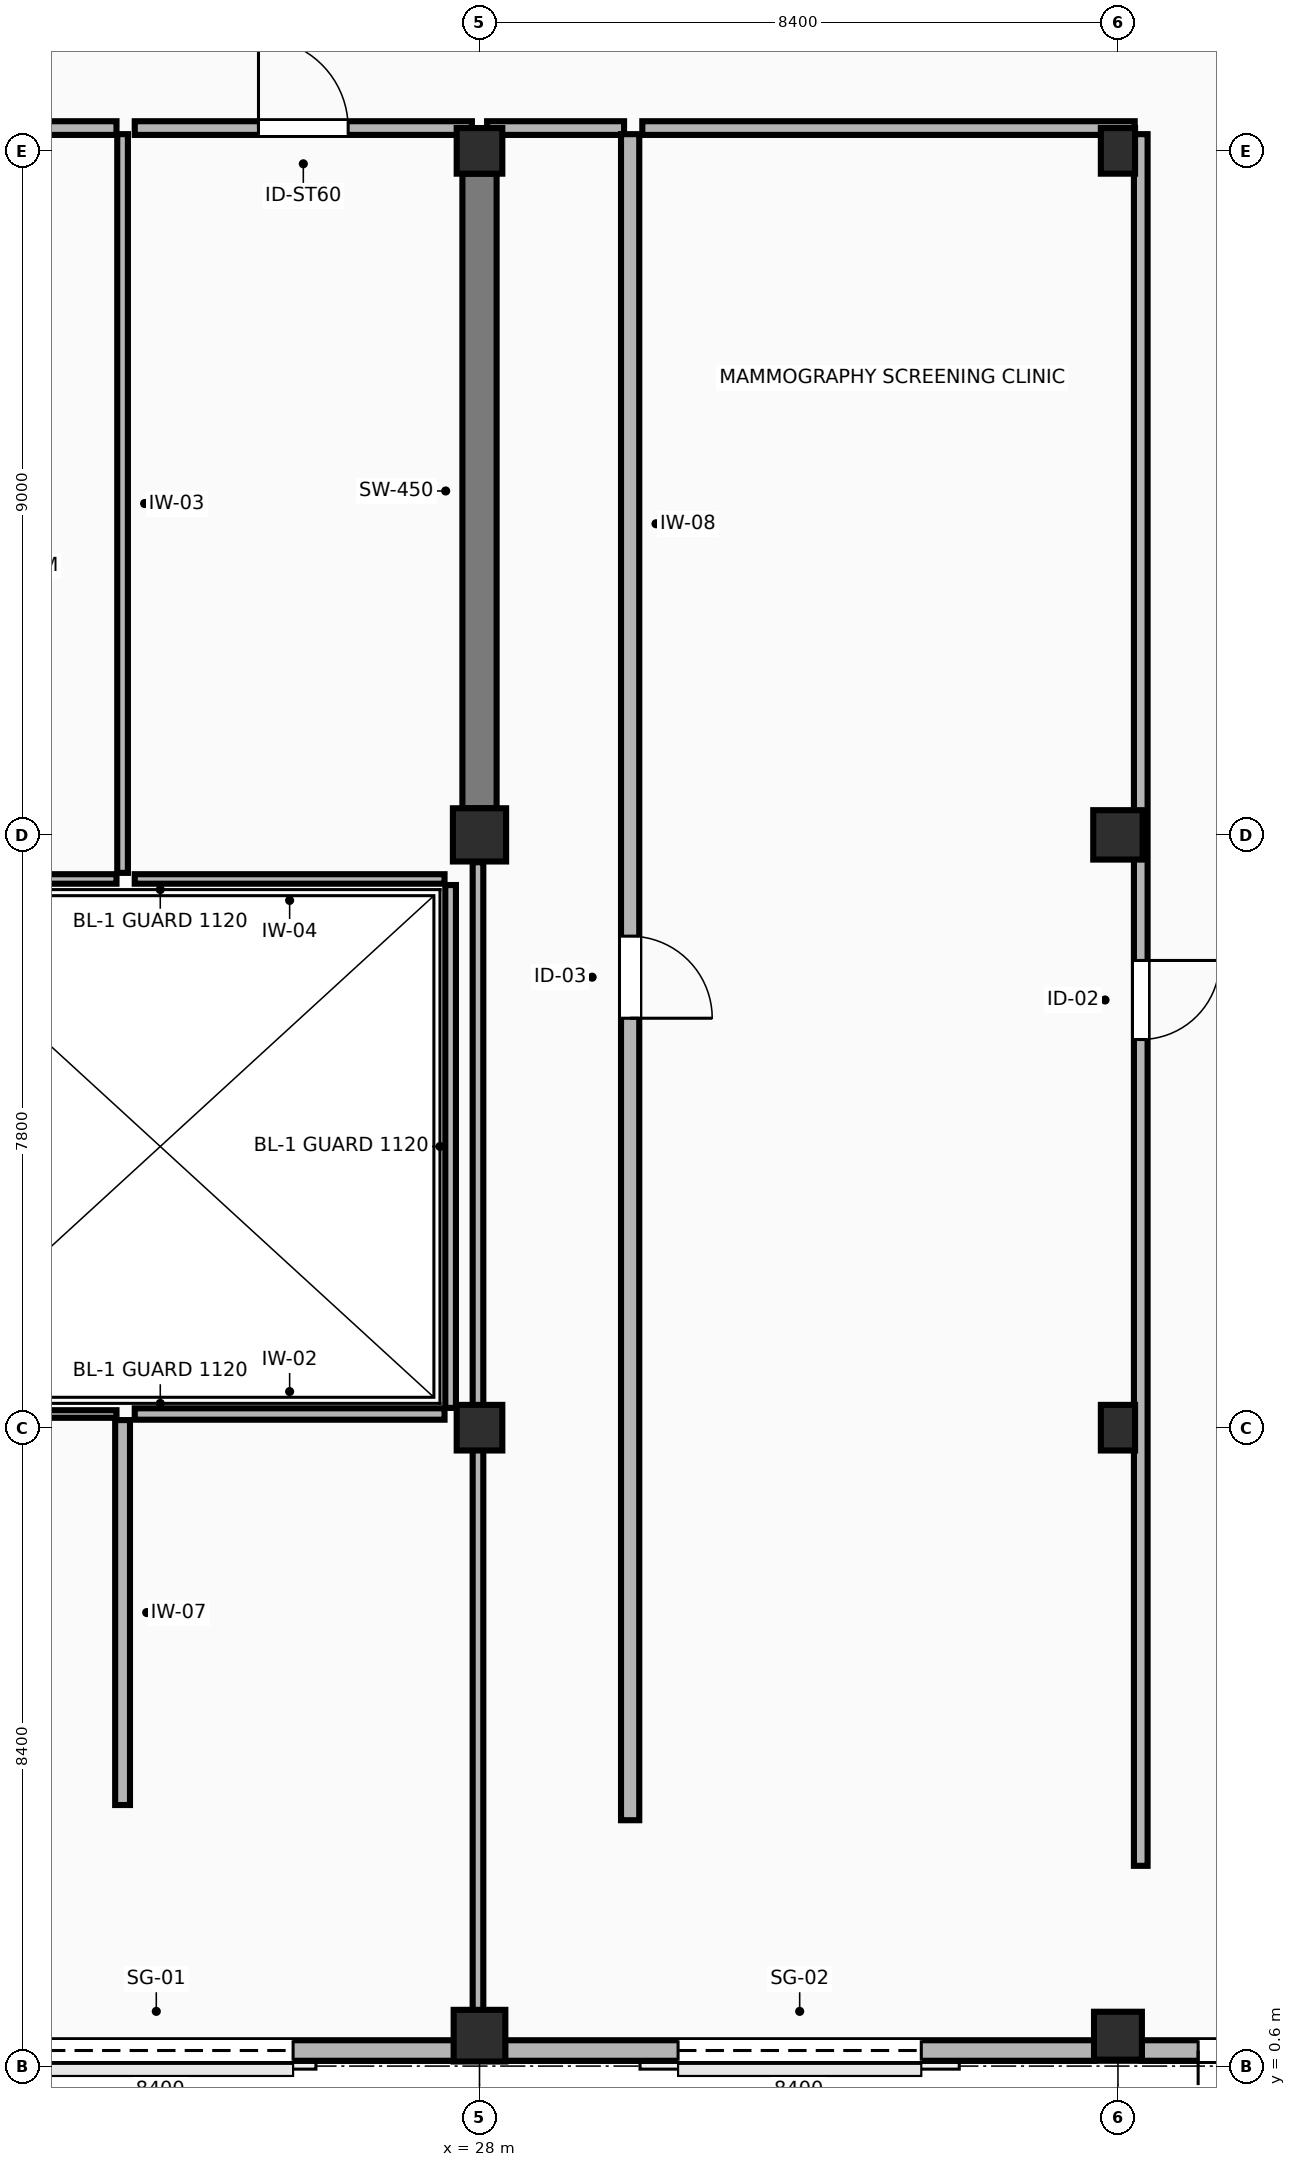
"""IFC4 building model, lengths in metres.
Left out: names, types, materials, properties, quantities, classifications, styles, units other than length and angle.
Written with IfcOpenShell. Run it as: python <this file> out.ifc"""

import sys

from ifc_helpers import new_model, si_unit, direction, frame, frame_2d, origin, origin_2d, place, context, subcontext, project, spatial, rectangle, extrude, element, fill, save


model = new_model("IFC4")
c1 = context("Model", 3, precision=1e-05, world=origin(), true_north=direction((0.0, 1.0)))
c2 = subcontext(c1, "Body", "Model", "MODEL_VIEW")
j1 = project(units=[si_unit("LENGTHUNIT", "METRE"), si_unit("PLANEANGLEUNIT", "RADIAN")], contexts=[c1])
p1 = place(None, origin())
s1 = spatial("IfcSite", under=j1, at=p1, CompositionType="ELEMENT")
p2 = place(p1, origin())
s2 = spatial("IfcBuilding", under=s1, at=p2, CompositionType="ELEMENT")
p3 = place(p2, origin())
s3 = spatial("IfcBuildingStorey", under=s2, at=p3, CompositionType="ELEMENT", Elevation=0.0)
p4 = place(p3, frame((28.0, 1.0, -1.75), z_axis=(0.0, 0.0, 1.0), x_axis=(1.0, 0.0, 0.0)))
e1 = element("IfcColumn", 1, at=p4, inside=s3, PredefinedType="COLUMN", context=c2, shape_type="SweptSolid", body=[
    extrude(rectangle(XDim=0.68, YDim=0.68, at=origin_2d()), origin(), (0.0, 0.0, 1.0), 7.15),
])
p5 = place(p3, frame((28.0, 9.0, 0.0), z_axis=(0.0, 0.0, 1.0), x_axis=(1.0, 0.0, 0.0)))
e2 = element("IfcColumn", 2, at=p5, inside=s3, PredefinedType="COLUMN", context=c2, shape_type="SweptSolid", body=[
    extrude(rectangle(XDim=0.6, YDim=0.6, at=origin_2d()), origin(), (0.0, 0.0, 1.0), 5.4),
])
p6 = place(p3, frame((28.0, 16.8, 0.0), z_axis=(0.0, 0.0, 1.0), x_axis=(1.0, 0.0, 0.0)))
e3 = element("IfcColumn", 3, at=p6, inside=s3, PredefinedType="COLUMN", context=c2, shape_type="SweptSolid", body=[
    extrude(rectangle(XDim=0.7, YDim=0.7, at=origin_2d()), origin(), (0.0, 0.0, 1.0), 5.4),
])
p7 = place(p3, frame((28.0, 25.8, 0.0), z_axis=(0.0, 0.0, 1.0), x_axis=(1.0, 0.0, 0.0)))
e4 = element("IfcColumn", 4, at=p7, inside=s3, PredefinedType="COLUMN", context=c2, shape_type="SweptSolid", body=[
    extrude(rectangle(XDim=0.6, YDim=0.6, at=origin_2d()), origin(), (0.0, 0.0, 1.0), 5.4),
])
p8 = place(p3, frame((36.4, 1.0, -1.75), z_axis=(0.0, 0.0, 1.0), x_axis=(1.0, 0.0, 0.0)))
e5 = element("IfcColumn", 5, at=p8, inside=s3, PredefinedType="COLUMN", context=c2, shape_type="SweptSolid", body=[
    extrude(rectangle(XDim=0.63, YDim=0.63, at=origin_2d()), origin(), (0.0, 0.0, 1.0), 7.15),
])
p9 = place(p3, frame((36.4, 9.0, 0.0), z_axis=(0.0, 0.0, 1.0), x_axis=(1.0, 0.0, 0.0)))
e6 = element("IfcColumn", 6, at=p9, inside=s3, PredefinedType="COLUMN", context=c2, shape_type="SweptSolid", body=[
    extrude(rectangle(XDim=0.45, YDim=0.6, at=origin_2d()), origin(), (0.0, 0.0, 1.0), 5.4),
])
p10 = place(p3, frame((36.4, 16.8, 0.0), z_axis=(0.0, 0.0, 1.0), x_axis=(1.0, 0.0, 0.0)))
e7 = element("IfcColumn", 7, at=p10, inside=s3, PredefinedType="COLUMN", context=c2, shape_type="SweptSolid", body=[
    extrude(rectangle(XDim=0.65, YDim=0.65, at=origin_2d()), origin(), (0.0, 0.0, 1.0), 5.4),
])
p11 = place(p3, frame((36.4, 25.8, 0.0), z_axis=(0.0, 0.0, 1.0), x_axis=(1.0, 0.0, 0.0)))
e8 = element("IfcColumn", 8, at=p11, inside=s3, PredefinedType="COLUMN", context=c2, shape_type="SweptSolid", body=[
    extrude(rectangle(XDim=0.45, YDim=0.6, at=origin_2d()), origin(), (0.0, 0.0, 1.0), 5.4),
])
p12 = place(p3, frame((19.83, 0.805, 0.0), z_axis=(0.0, 0.0, 1.0), x_axis=(1.0, 0.0, 0.0)))
e9 = element("IfcWall", 9, at=p12, inside=s3, PredefinedType="STANDARD", context=c2, shape_type="SweptSolid", body=[
    extrude(rectangle(XDim=7.835, YDim=0.27, at=frame_2d((3.917, 0.0))), origin(), (0.0, 0.0, 1.0), 4.42),
])
p13 = place(p12, frame((2.117, 0.0, 0.0)))
e10 = element("IfcOpeningElement", 10, at=p13, cuts=e9, PredefinedType="OPENING", context=c2, shape_type="SweptSolid", body=[
    extrude(rectangle(XDim=3.6, YDim=3.0, at=frame_2d((1.8, 1.5))), frame((0.0, 0.145, 0.0), z_axis=(0.0, -1.0, 0.0), x_axis=(1.0, 0.0, 0.0)), (0.0, 0.0, 1.0), 0.29),
])
p14 = place(p3, frame((28.335, 0.805, 0.0), z_axis=(0.0, 0.0, 1.0), x_axis=(1.0, 0.0, 0.0)))
e11 = element("IfcWall", 11, at=p14, inside=s3, PredefinedType="STANDARD", context=c2, shape_type="SweptSolid", body=[
    extrude(rectangle(XDim=7.755, YDim=0.27, at=frame_2d((3.877, 0.0))), origin(), (0.0, 0.0, 1.0), 4.42),
])
p15 = place(p14, frame((2.278, 0.0, 0.0)))
e12 = element("IfcOpeningElement", 12, at=p15, cuts=e11, PredefinedType="OPENING", context=c2, shape_type="SweptSolid", body=[
    extrude(rectangle(XDim=3.2, YDim=2.8, at=frame_2d((1.6, 1.4))), frame((0.0, 0.145, 0.0), z_axis=(0.0, -1.0, 0.0), x_axis=(1.0, 0.0, 0.0)), (0.0, 0.0, 1.0), 0.29),
])
p16 = place(p3, frame((36.71, 0.805, 0.0), z_axis=(0.0, 0.0, 1.0), x_axis=(1.0, 0.0, 0.0)))
e13 = element("IfcWall", 13, at=p16, inside=s3, PredefinedType="STANDARD", context=c2, shape_type="SweptSolid", body=[
    extrude(rectangle(XDim=7.805, YDim=0.27, at=frame_2d((3.902, 0.0))), origin(), (0.0, 0.0, 1.0), 4.42),
])
p17 = place(p16, frame((0.745, 0.0, 0.0)))
e14 = element("IfcOpeningElement", 14, at=p17, cuts=e13, PredefinedType="OPENING", context=c2, shape_type="SweptSolid", body=[
    extrude(rectangle(XDim=2.0, YDim=2.4, at=frame_2d((1.0, 1.2))), frame((0.0, 0.145, 0.0), z_axis=(0.0, -1.0, 0.0), x_axis=(1.0, 0.0, 0.0)), (0.0, 0.0, 1.0), 0.29),
])
p18 = place(p3, frame((28.0, 17.15, -0.35), z_axis=(0.0, 0.0, 1.0), x_axis=(0.0, 1.0, 0.0)))
e15 = element("IfcWall", 15, at=p18, inside=s3, PredefinedType="SHEAR", context=c2, shape_type="SweptSolid", body=[
    extrude(rectangle(XDim=8.35, YDim=0.45, at=frame_2d((4.175, 0.0))), origin(), (0.0, 0.0, 1.0), 5.4),
])
p19 = place(p3, frame((17.38, 26.1, 0.0), z_axis=(0.0, 0.0, 1.0), x_axis=(1.0, 0.0, 0.0)))
e16 = element("IfcWall", 16, at=p19, inside=s3, PredefinedType="PARTITIONING", context=c2, shape_type="SweptSolid", body=[
    extrude(rectangle(XDim=5.844, YDim=0.18, at=frame_2d((2.922, 0.0))), origin(), (0.0, 0.0, 1.0), 4.385),
])
p20 = place(p19, frame((2.922, 0.0, 0.0)))
e17 = element("IfcOpeningElement", 17, at=p20, cuts=e16, PredefinedType="OPENING", context=c2, shape_type="SweptSolid", body=[
    extrude(rectangle(XDim=1.5, YDim=2.3, at=frame_2d((0.75, 1.15))), frame((0.0, 0.1, 0.0), z_axis=(0.0, -1.0, 0.0), x_axis=(1.0, 0.0, 0.0)), (0.0, 0.0, 1.0), 0.2),
])
p21 = place(p3, frame((23.304, 26.02, 0.0), z_axis=(0.0, 0.0, 1.0), x_axis=(0.0, -1.0, 0.0)))
e18 = element("IfcWall", 18, at=p21, inside=s3, PredefinedType="PARTITIONING", context=c2, shape_type="SweptSolid", body=[
    extrude(rectangle(XDim=9.72, YDim=0.14, at=frame_2d((4.86, 0.0))), origin(), (0.0, 0.0, 1.0), 5.05),
])
p22 = place(p3, frame((23.224, 16.22, 0.0), z_axis=(0.0, 0.0, 1.0), x_axis=(-1.0, 0.0, 0.0)))
e19 = element("IfcWall", 19, at=p22, inside=s3, PredefinedType="PARTITIONING", context=c2, shape_type="SweptSolid", body=[
    extrude(rectangle(XDim=3.164, YDim=0.125, at=frame_2d((1.582, 0.0))), origin(), (0.0, 0.0, 1.0), 5.05),
])
p23 = place(p3, frame((20.06, 9.18, 0.0), z_axis=(0.0, 0.0, 1.0), x_axis=(1.0, 0.0, 0.0)))
e20 = element("IfcWall", 20, at=p23, inside=s3, PredefinedType="PARTITIONING", context=c2, shape_type="SweptSolid", body=[
    extrude(rectangle(XDim=3.164, YDim=0.1, at=frame_2d((1.582, 0.0))), origin(), (0.0, 0.0, 1.0), 4.46),
])
p24 = place(p3, frame((23.304, 9.1, 0.0), z_axis=(0.0, 0.0, 1.0), x_axis=(0.0, -1.0, 0.0)))
e21 = element("IfcWall", 21, at=p24, inside=s3, PredefinedType="PARTITIONING", context=c2, shape_type="SweptSolid", body=[
    extrude(rectangle(XDim=5.065, YDim=0.195, at=frame_2d((2.533, 0.0))), origin(), (0.0, 0.0, 1.0), 5.05),
])
p25 = place(p3, frame((23.464, 9.18, 0.0), z_axis=(0.0, 0.0, 1.0), x_axis=(1.0, 0.0, 0.0)))
e22 = element("IfcWall", 22, at=p25, inside=s3, PredefinedType="PARTITIONING", context=c2, shape_type="SweptSolid", body=[
    extrude(rectangle(XDim=4.076, YDim=0.15, at=frame_2d((2.038, 0.0))), origin(), (0.0, 0.0, 1.0), 4.46),
])
p26 = place(p3, frame((27.62, 9.26, 0.0), z_axis=(0.0, 0.0, 1.0), x_axis=(0.0, 1.0, 0.0)))
e23 = element("IfcWall", 23, at=p26, inside=s3, PredefinedType="PARTITIONING", context=c2, shape_type="SweptSolid", body=[
    extrude(rectangle(XDim=6.88, YDim=0.14, at=frame_2d((3.44, 0.0))), origin(), (0.0, 0.0, 1.0), 4.61),
])
p27 = place(p3, frame((27.54, 16.22, 0.0), z_axis=(0.0, 0.0, 1.0), x_axis=(-1.0, 0.0, 0.0)))
e24 = element("IfcWall", 24, at=p27, inside=s3, PredefinedType="PARTITIONING", context=c2, shape_type="SweptSolid", body=[
    extrude(rectangle(XDim=4.076, YDim=0.125, at=frame_2d((2.038, 0.0))), origin(), (0.0, 0.0, 1.0), 5.05),
])
p28 = place(p3, frame((23.464, 26.1, 0.0), z_axis=(0.0, 0.0, 1.0), x_axis=(1.0, 0.0, 0.0)))
e25 = element("IfcWall", 25, at=p28, inside=s3, PredefinedType="PARTITIONING", context=c2, shape_type="SweptSolid", body=[
    extrude(rectangle(XDim=4.436, YDim=0.18, at=frame_2d((2.218, 0.0))), origin(), (0.0, 0.0, 1.0), 4.385),
])
p29 = place(p28, frame((1.628, 0.0, 0.0)))
e26 = element("IfcOpeningElement", 26, at=p29, cuts=e25, PredefinedType="OPENING", context=c2, shape_type="SweptSolid", body=[
    extrude(rectangle(XDim=1.18, YDim=2.18, at=frame_2d((0.59, 1.09))), frame((0.0, 0.1, 0.0), z_axis=(0.0, -1.0, 0.0), x_axis=(1.0, 0.0, 0.0)), (0.0, 0.0, 1.0), 0.2),
])
p30 = place(p3, frame((27.98, 16.44, 0.0), z_axis=(0.0, 0.0, 1.0), x_axis=(0.0, -1.0, 0.0)))
e27 = element("IfcWall", 27, at=p30, inside=s3, PredefinedType="PARTITIONING", context=c2, shape_type="SweptSolid", body=[
    extrude(rectangle(XDim=15.35, YDim=0.14, at=frame_2d((7.675, 0.0))), origin(), (0.0, 0.0, 1.0), 4.61),
])
p31 = place(p3, frame((28.1, 26.1, 0.0), z_axis=(0.0, 0.0, 1.0), x_axis=(1.0, 0.0, 0.0)))
e28 = element("IfcWall", 28, at=p31, inside=s3, PredefinedType="PARTITIONING", context=c2, shape_type="SweptSolid", body=[
    extrude(rectangle(XDim=1.802, YDim=0.18, at=frame_2d((0.901, 0.0))), origin(), (0.0, 0.0, 1.0), 4.385),
])
p32 = place(p3, frame((29.982, 26.02, 0.0), z_axis=(0.0, 0.0, 1.0), x_axis=(0.0, -1.0, 0.0)))
e29 = element("IfcWall", 29, at=p32, inside=s3, PredefinedType="PARTITIONING", context=c2, shape_type="SweptSolid", body=[
    extrude(rectangle(XDim=22.185, YDim=0.24, at=frame_2d((11.093, 0.0))), origin(), (0.0, 0.0, 1.0), 5.05),
])
p33 = place(p32, frame((10.552, 0.0, 0.0)))
e30 = element("IfcOpeningElement", 30, at=p33, cuts=e29, PredefinedType="OPENING", context=c2, shape_type="SweptSolid", body=[
    extrude(rectangle(XDim=1.08, YDim=2.2, at=frame_2d((0.54, 1.1))), frame((0.0, 0.13, 0.0), z_axis=(0.0, -1.0, 0.0), x_axis=(1.0, 0.0, 0.0)), (0.0, 0.0, 1.0), 0.26),
])
p34 = place(p3, frame((30.142, 26.1, 0.0), z_axis=(0.0, 0.0, 1.0), x_axis=(1.0, 0.0, 0.0)))
e31 = element("IfcWall", 31, at=p34, inside=s3, PredefinedType="PARTITIONING", context=c2, shape_type="SweptSolid", body=[
    extrude(rectangle(XDim=6.478, YDim=0.18, at=frame_2d((3.239, 0.0))), origin(), (0.0, 0.0, 1.0), 4.385),
])
p35 = place(p3, frame((36.7, 26.02, 0.0), z_axis=(0.0, 0.0, 1.0), x_axis=(0.0, -1.0, 0.0)))
e32 = element("IfcWall", 32, at=p35, inside=s3, PredefinedType="PARTITIONING", context=c2, shape_type="SweptSolid", body=[
    extrude(rectangle(XDim=22.785, YDim=0.18, at=frame_2d((11.393, 0.0))), origin(), (0.0, 0.0, 1.0), 4.535),
])
p36 = place(p35, frame((10.873, 0.0, 0.0)))
e33 = element("IfcOpeningElement", 33, at=p36, cuts=e32, PredefinedType="OPENING", context=c2, shape_type="SweptSolid", body=[
    extrude(rectangle(XDim=1.04, YDim=2.15, at=frame_2d((0.52, 1.075))), frame((0.0, 0.1, 0.0), z_axis=(0.0, -1.0, 0.0), x_axis=(1.0, 0.0, 0.0)), (0.0, 0.0, 1.0), 0.2),
])
p37 = place(p13, frame((3.6, 0.0, 0.0), z_axis=(0.0, 0.0, 1.0), x_axis=(-1.0, 0.0, 0.0)))
e34 = element("IfcDoor", 34, at=p37, inside=s3, OperationType="DOUBLE_DOOR_SINGLE_SWING", PredefinedType="GATE", context=c2, shape_type="SweptSolid", body=[
    extrude(rectangle(XDim=3.6, YDim=3.0, at=frame_2d((1.8, 1.5))), frame((0.0, 0.025, 0.0), z_axis=(0.0, -1.0, 0.0), x_axis=(1.0, 0.0, 0.0)), (0.0, 0.0, 1.0), 0.05),
])
fill(e10, e34)
p38 = place(p15, frame((3.2, 0.0, 0.0), z_axis=(0.0, 0.0, 1.0), x_axis=(-1.0, 0.0, 0.0)))
e35 = element("IfcDoor", 35, at=p38, inside=s3, OperationType="DOUBLE_DOOR_SINGLE_SWING", PredefinedType="GATE", context=c2, shape_type="SweptSolid", body=[
    extrude(rectangle(XDim=3.2, YDim=2.8, at=frame_2d((1.6, 1.4))), frame((0.0, 0.025, 0.0), z_axis=(0.0, -1.0, 0.0), x_axis=(1.0, 0.0, 0.0)), (0.0, 0.0, 1.0), 0.05),
])
fill(e12, e35)
p39 = place(p17, frame((2.0, 0.0, 0.0), z_axis=(0.0, 0.0, 1.0), x_axis=(-1.0, 0.0, 0.0)))
e36 = element("IfcDoor", 36, at=p39, inside=s3, OperationType="DOUBLE_DOOR_SINGLE_SWING", PredefinedType="DOOR", context=c2, shape_type="SweptSolid", body=[
    extrude(rectangle(XDim=2.0, YDim=2.4, at=frame_2d((1.0, 1.2))), frame((0.0, 0.025, 0.0), z_axis=(0.0, -1.0, 0.0), x_axis=(1.0, 0.0, 0.0)), (0.0, 0.0, 1.0), 0.05),
])
fill(e14, e36)
p40 = place(p29, origin())
e37 = element("IfcDoor", 37, at=p40, inside=s3, OperationType="SINGLE_SWING_LEFT", PredefinedType="DOOR", context=c2, shape_type="SweptSolid", body=[
    extrude(rectangle(XDim=1.18, YDim=2.18, at=frame_2d((0.59, 1.09))), frame((0.0, 0.025, 0.0), z_axis=(0.0, -1.0, 0.0), x_axis=(1.0, 0.0, 0.0)), (0.0, 0.0, 1.0), 0.05),
])
fill(e26, e37)
p41 = place(p33, origin())
e38 = element("IfcDoor", 38, at=p41, inside=s3, OperationType="SINGLE_SWING_RIGHT", PredefinedType="DOOR", context=c2, shape_type="SweptSolid", body=[
    extrude(rectangle(XDim=1.08, YDim=2.2, at=frame_2d((0.54, 1.1))), frame((0.0, 0.025, 0.0), z_axis=(0.0, -1.0, 0.0), x_axis=(1.0, 0.0, 0.0)), (0.0, 0.0, 1.0), 0.05),
])
fill(e30, e38)
p42 = place(p36, origin())
e39 = element("IfcDoor", 39, at=p42, inside=s3, OperationType="SINGLE_SWING_LEFT", PredefinedType="DOOR", context=c2, shape_type="SweptSolid", body=[
    extrude(rectangle(XDim=1.04, YDim=2.15, at=frame_2d((0.52, 1.075))), frame((0.0, 0.025, 0.0), z_axis=(0.0, -1.0, 0.0), x_axis=(1.0, 0.0, 0.0)), (0.0, 0.0, 1.0), 0.05),
])
fill(e33, e39)
save(model, sys.argv[1])
